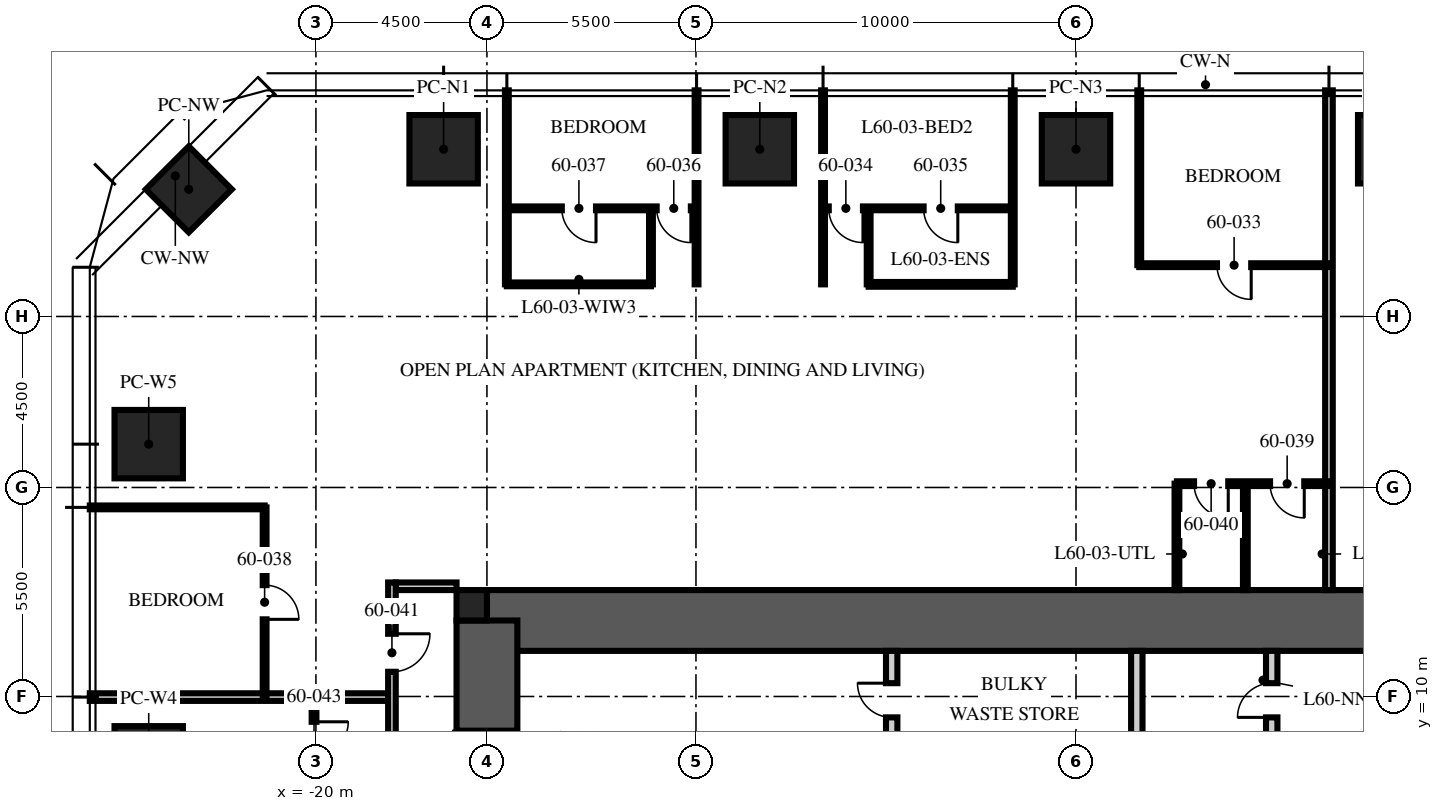
"""IFC4 building model, lengths in metres.
Left out: names, types, materials, properties, quantities, classifications, styles, units other than length and angle.
Written with IfcOpenShell. Run it as: python <this file> out.ifc"""

import sys

from ifc_helpers import new_model, si_unit, direction, frame, frame_2d, origin, origin_2d, place, context, subcontext, project, spatial, rectangle, extrude, element, fill, save


model = new_model("IFC4")
c1 = context("Model", 3, precision=1e-05, world=origin(), true_north=direction((0.0, 1.0)))
c2 = subcontext(c1, "Body", "Model", "MODEL_VIEW")
j1 = project(units=[si_unit("LENGTHUNIT", "METRE"), si_unit("PLANEANGLEUNIT", "RADIAN")], contexts=[c1])
p1 = place(None, origin())
s1 = spatial("IfcSite", under=j1, at=p1, CompositionType="ELEMENT")
p2 = place(p1, origin())
s2 = spatial("IfcBuilding", under=s1, at=p2, CompositionType="ELEMENT")
p3 = place(p2, frame((0.0, 0.0, 240.75)))
s3 = spatial("IfcBuildingStorey", under=s2, at=p3, CompositionType="ELEMENT", Elevation=240.75)
p4 = place(p3, frame((-15.5, 12.0, -0.25), z_axis=(0.0, 0.0, 1.0), x_axis=(1.0, 0.0, 0.0)))
e1 = element("IfcWall", 1, at=p4, inside=s3, PredefinedType="SHEAR", context=c2, shape_type="SweptSolid", body=[
    extrude(rectangle(XDim=31.0, YDim=1.6, at=frame_2d((15.5, 0.0))), origin(), (0.0, 0.0, 1.0), 3.75),
])
p5 = place(p3, frame((-15.5, -12.0, -0.25), z_axis=(0.0, 0.0, 1.0), x_axis=(0.0, 1.0, 0.0)))
e2 = element("IfcWall", 2, at=p5, inside=s3, PredefinedType="SHEAR", context=c2, shape_type="SweptSolid", body=[
    extrude(rectangle(XDim=24.0, YDim=1.6, at=frame_2d((12.0, 0.0))), origin(), (0.0, 0.0, 1.0), 3.75),
])
p6 = place(p5, frame((3.2, 0.0, 0.25)))
e3 = element("IfcOpeningElement", 3, at=p6, cuts=e2, PredefinedType="OPENING", context=c2, shape_type="SweptSolid", body=[
    extrude(rectangle(XDim=1.2, YDim=2.1, at=frame_2d((0.6, 1.05))), frame((0.0, 0.81, 0.0), z_axis=(0.0, -1.0, 0.0), x_axis=(1.0, 0.0, 0.0)), (0.0, 0.0, 1.0), 1.62),
])
p7 = place(p5, frame((19.3, 0.0, 0.25)))
e4 = element("IfcOpeningElement", 4, at=p7, cuts=e2, PredefinedType="OPENING", context=c2, shape_type="SweptSolid", body=[
    extrude(rectangle(XDim=1.8, YDim=2.1, at=frame_2d((0.9, 1.05))), frame((0.0, 0.81, 0.0), z_axis=(0.0, -1.0, 0.0), x_axis=(1.0, 0.0, 0.0)), (0.0, 0.0, 1.0), 1.62),
])
p8 = place(p3, frame((-15.9, 12.4, -0.25), z_axis=(0.0, 0.0, 1.0), x_axis=(1.0, 0.0, 0.0)))
e5 = element("IfcColumn", 5, at=p8, inside=s3, PredefinedType="COLUMN", context=c2, shape_type="SweptSolid", body=[
    extrude(rectangle(XDim=0.8, YDim=0.8, at=origin_2d()), origin(), (0.0, 0.0, 1.0), 3.75),
])
for number, where, z_axis, x_axis in (
    (6, (-16.64, 24.4, 0.0), (0.0, 0.0, 1.0), (1.0, 0.0, 0.0)),
    (7, (-8.32, 24.4, 0.0), (0.0, 0.0, 1.0), (1.0, 0.0, 0.0)),
    (8, (0.0, 24.4, 0.0), (0.0, 0.0, 1.0), (1.0, 0.0, 0.0)),
    (9, (8.32, 24.4, 0.0), (0.0, 0.0, 1.0), (1.0, 0.0, 0.0)),
    (10, (-24.4, 8.32, 0.0), (0.0, 0.0, 1.0), (0.0, 1.0, 0.0)),
    (11, (-24.4, 16.64, 0.0), (0.0, 0.0, 1.0), (0.0, 1.0, 0.0)),
):
    element("IfcColumn", number, at=place(p3, frame(where, z_axis=z_axis, x_axis=x_axis)), inside=s3, PredefinedType="COLUMN", context=c2, shape_type="SweptSolid", body=[
        extrude(rectangle(XDim=1.8, YDim=1.8, at=origin_2d()), origin(), (0.0, 0.0, 1.0), 3.75),
    ])
p9 = place(p3, frame((-23.346, 23.346, 0.0), z_axis=(0.0, 0.0, 1.0), x_axis=(0.707106781187, 0.707106781187, 0.0)))
e12 = element("IfcColumn", 12, at=p9, inside=s3, PredefinedType="COLUMN", context=c2, shape_type="SweptSolid", body=[
    extrude(rectangle(XDim=1.6, YDim=1.6, at=origin_2d()), origin(), (0.0, 0.0, 1.0), 3.75),
])
p10 = place(p3, frame((-4.85, 5.3, 0.0), z_axis=(0.0, 0.0, 1.0), x_axis=(0.0, 1.0, 0.0)))
e13 = element("IfcWall", 13, at=p10, inside=s3, PredefinedType="PARTITIONING", context=c2, shape_type="SweptSolid", body=[
    extrude(rectangle(XDim=5.9, YDim=0.3, at=frame_2d((2.95, 0.0))), origin(), (0.0, 0.0, 1.0), 3.5),
])
p11 = place(p10, frame((4.15, 0.0, 0.0)))
e14 = element("IfcOpeningElement", 14, at=p11, cuts=e13, PredefinedType="OPENING", context=c2, shape_type="SweptSolid", body=[
    extrude(rectangle(XDim=0.9, YDim=2.1, at=frame_2d((0.45, 1.05))), frame((0.0, 0.16, 0.0), z_axis=(0.0, -1.0, 0.0), x_axis=(1.0, 0.0, 0.0)), (0.0, 0.0, 1.0), 0.32),
])
p12 = place(p3, frame((5.15, 5.3, 0.0), z_axis=(0.0, 0.0, 1.0), x_axis=(0.0, 1.0, 0.0)))
e15 = element("IfcWall", 15, at=p12, inside=s3, PredefinedType="PARTITIONING", context=c2, shape_type="SweptSolid", body=[
    extrude(rectangle(XDim=5.9, YDim=0.3, at=frame_2d((2.95, 0.0))), origin(), (0.0, 0.0, 1.0), 3.5),
])
p13 = place(p12, frame((4.15, 0.0, 0.0)))
e16 = element("IfcOpeningElement", 16, at=p13, cuts=e15, PredefinedType="OPENING", context=c2, shape_type="SweptSolid", body=[
    extrude(rectangle(XDim=0.9, YDim=2.1, at=frame_2d((0.45, 1.05))), frame((0.0, 0.16, 0.0), z_axis=(0.0, -1.0, 0.0), x_axis=(1.0, 0.0, 0.0)), (0.0, 0.0, 1.0), 0.32),
])
p14 = place(p3, frame((1.6, 8.5, 0.0), z_axis=(0.0, 0.0, 1.0), x_axis=(0.0, 1.0, 0.0)))
e17 = element("IfcWall", 17, at=p14, inside=s3, PredefinedType="PARTITIONING", context=c2, shape_type="SweptSolid", body=[
    extrude(rectangle(XDim=2.7, YDim=0.3, at=frame_2d((1.35, 0.0))), origin(), (0.0, 0.0, 1.0), 3.5),
])
p15 = place(p3, frame((-16.3, 12.9, 0.0), z_axis=(0.0, 0.0, 1.0), x_axis=(-1.0, 0.0, 0.0)))
e18 = element("IfcWall", 18, at=p15, inside=s3, PredefinedType="PARTITIONING", context=c2, shape_type="SweptSolid", body=[
    extrude(rectangle(XDim=1.6, YDim=0.2, at=frame_2d((0.8, 0.0))), origin(), (0.0, 0.0, 1.0), 2.3),
])
p16 = place(p3, frame((6.656, 12.8, 0.0), z_axis=(0.0, 0.0, 1.0), x_axis=(0.0, 1.0, 0.0)))
e19 = element("IfcWall", 19, at=p16, inside=s3, PredefinedType="PARTITIONING", context=c2, shape_type="SweptSolid", body=[
    extrude(rectangle(XDim=13.15, YDim=0.2, at=frame_2d((6.575, 0.0))), origin(), (0.0, 0.0, 1.0), 2.91),
])
p17 = place(p3, frame((1.664, 21.35, 0.0), z_axis=(0.0, 0.0, 1.0), x_axis=(0.0, 1.0, 0.0)))
e20 = element("IfcWall", 20, at=p17, inside=s3, PredefinedType="PARTITIONING", context=c2, shape_type="SweptSolid", body=[
    extrude(rectangle(XDim=4.6, YDim=0.1, at=frame_2d((2.3, 0.0))), origin(), (0.0, 0.0, 1.0), 2.91),
])
for number, where, z_axis, x_axis in (
    (21, (-1.664, 20.845, 0.0), (0.0, 0.0, 1.0), (0.0, 1.0, 0.0)),
    (22, (-6.656, 20.845, 0.0), (0.0, 0.0, 1.0), (0.0, 1.0, 0.0)),
    (23, (-9.984, 20.845, 0.0), (0.0, 0.0, 1.0), (0.0, 1.0, 0.0)),
    (24, (-14.976, 20.845, 0.0), (0.0, 0.0, 1.0), (0.0, 1.0, 0.0)),
):
    element("IfcWall", number, at=place(p3, frame(where, z_axis=z_axis, x_axis=x_axis)), inside=s3, PredefinedType="PARTITIONING", context=c2, shape_type="SweptSolid", body=[
        extrude(rectangle(XDim=5.105, YDim=0.1, at=frame_2d((2.552, 0.0))), origin(), (0.0, 0.0, 1.0), 2.91),
    ])
p18 = place(p3, frame((-21.35, 14.976, 0.0), z_axis=(0.0, 0.0, 1.0), x_axis=(-1.0, 0.0, 0.0)))
e25 = element("IfcWall", 25, at=p18, inside=s3, PredefinedType="PARTITIONING", context=c2, shape_type="SweptSolid", body=[
    extrude(rectangle(XDim=4.6, YDim=0.1, at=frame_2d((2.3, 0.0))), origin(), (0.0, 0.0, 1.0), 2.91),
])
p19 = place(p3, frame((-18.1, 9.984, 0.0), z_axis=(0.0, 0.0, 1.0), x_axis=(-1.0, 0.0, 0.0)))
e26 = element("IfcWall", 26, at=p19, inside=s3, PredefinedType="PARTITIONING", context=c2, shape_type="SweptSolid", body=[
    extrude(rectangle(XDim=7.85, YDim=0.2, at=frame_2d((3.925, 0.0))), origin(), (0.0, 0.0, 1.0), 2.91),
])
p20 = place(p3, frame((6.656, 21.35, 0.0), z_axis=(0.0, 0.0, 1.0), x_axis=(-1.0, 0.0, 0.0)))
e27 = element("IfcWall", 27, at=p20, inside=s3, PredefinedType="PARTITIONING", context=c2, shape_type="SweptSolid", body=[
    extrude(rectangle(XDim=4.992, YDim=0.1, at=frame_2d((2.496, 0.0))), origin(), (0.0, 0.0, 1.0), 2.81),
])
p21 = place(p20, frame((2.046, 0.0, 0.0)))
e28 = element("IfcOpeningElement", 28, at=p21, cuts=e27, PredefinedType="OPENING", context=c2, shape_type="SweptSolid", body=[
    extrude(rectangle(XDim=0.9, YDim=2.1, at=frame_2d((0.45, 1.05))), frame((0.0, 0.06, 0.0), z_axis=(0.0, -1.0, 0.0), x_axis=(1.0, 0.0, 0.0)), (0.0, 0.0, 1.0), 0.12),
])
p22 = place(p3, frame((-1.664, 22.845, 0.0), z_axis=(0.0, 0.0, 1.0), x_axis=(-1.0, 0.0, 0.0)))
e29 = element("IfcWall", 29, at=p22, inside=s3, PredefinedType="PARTITIONING", context=c2, shape_type="SweptSolid", body=[
    extrude(rectangle(XDim=4.992, YDim=0.1, at=frame_2d((2.496, 0.0))), origin(), (0.0, 0.0, 1.0), 2.81),
])
p23 = place(p22, frame((3.942, 0.0, 0.0)))
e30 = element("IfcOpeningElement", 30, at=p23, cuts=e29, PredefinedType="OPENING", context=c2, shape_type="SweptSolid", body=[
    extrude(rectangle(XDim=0.9, YDim=2.1, at=frame_2d((0.45, 1.05))), frame((0.0, 0.06, 0.0), z_axis=(0.0, -1.0, 0.0), x_axis=(1.0, 0.0, 0.0)), (0.0, 0.0, 1.0), 0.12),
])
p24 = place(p22, frame((1.446, 0.0, 0.0)))
e31 = element("IfcOpeningElement", 31, at=p24, cuts=e29, PredefinedType="OPENING", context=c2, shape_type="SweptSolid", body=[
    extrude(rectangle(XDim=0.9, YDim=2.1, at=frame_2d((0.45, 1.05))), frame((0.0, 0.06, 0.0), z_axis=(0.0, -1.0, 0.0), x_axis=(1.0, 0.0, 0.0)), (0.0, 0.0, 1.0), 0.12),
])
p25 = place(p3, frame((-5.456, 20.845, 0.0), z_axis=(0.0, 0.0, 1.0), x_axis=(0.0, 1.0, 0.0)))
e32 = element("IfcWall", 32, at=p25, inside=s3, PredefinedType="PARTITIONING", context=c2, shape_type="SweptSolid", body=[
    extrude(rectangle(XDim=2.0, YDim=0.1, at=frame_2d((1.0, 0.0))), origin(), (0.0, 0.0, 1.0), 3.5),
])
p26 = place(p3, frame((-1.664, 20.845, 0.0), z_axis=(0.0, 0.0, 1.0), x_axis=(-1.0, 0.0, 0.0)))
e33 = element("IfcWall", 33, at=p26, inside=s3, PredefinedType="PARTITIONING", context=c2, shape_type="SweptSolid", body=[
    extrude(rectangle(XDim=3.792, YDim=0.125, at=frame_2d((1.896, 0.0))), origin(), (0.0, 0.0, 1.0), 2.81),
])
p27 = place(p3, frame((-9.984, 22.845, 0.0), z_axis=(0.0, 0.0, 1.0), x_axis=(-1.0, 0.0, 0.0)))
e34 = element("IfcWall", 34, at=p27, inside=s3, PredefinedType="PARTITIONING", context=c2, shape_type="SweptSolid", body=[
    extrude(rectangle(XDim=4.992, YDim=0.1, at=frame_2d((2.496, 0.0))), origin(), (0.0, 0.0, 1.0), 2.81),
])
p28 = place(p27, frame((0.15, 0.0, 0.0)))
e35 = element("IfcOpeningElement", 35, at=p28, cuts=e34, PredefinedType="OPENING", context=c2, shape_type="SweptSolid", body=[
    extrude(rectangle(XDim=0.9, YDim=2.1, at=frame_2d((0.45, 1.05))), frame((0.0, 0.06, 0.0), z_axis=(0.0, -1.0, 0.0), x_axis=(1.0, 0.0, 0.0)), (0.0, 0.0, 1.0), 0.12),
])
p29 = place(p27, frame((2.646, 0.0, 0.0)))
e36 = element("IfcOpeningElement", 36, at=p29, cuts=e34, PredefinedType="OPENING", context=c2, shape_type="SweptSolid", body=[
    extrude(rectangle(XDim=0.9, YDim=2.1, at=frame_2d((0.45, 1.05))), frame((0.0, 0.06, 0.0), z_axis=(0.0, -1.0, 0.0), x_axis=(1.0, 0.0, 0.0)), (0.0, 0.0, 1.0), 0.12),
])
p30 = place(p3, frame((-11.184, 20.845, 0.0), z_axis=(0.0, 0.0, 1.0), x_axis=(0.0, 1.0, 0.0)))
e37 = element("IfcWall", 37, at=p30, inside=s3, PredefinedType="PARTITIONING", context=c2, shape_type="SweptSolid", body=[
    extrude(rectangle(XDim=2.0, YDim=0.1, at=frame_2d((1.0, 0.0))), origin(), (0.0, 0.0, 1.0), 3.5),
])
p31 = place(p3, frame((-11.184, 20.845, 0.0), z_axis=(0.0, 0.0, 1.0), x_axis=(-1.0, 0.0, 0.0)))
e38 = element("IfcWall", 38, at=p31, inside=s3, PredefinedType="PARTITIONING", context=c2, shape_type="SweptSolid", body=[
    extrude(rectangle(XDim=3.792, YDim=0.1, at=frame_2d((1.896, 0.0))), origin(), (0.0, 0.0, 1.0), 2.81),
])
p32 = place(p3, frame((-21.35, 14.976, 0.0), z_axis=(0.0, 0.0, 1.0), x_axis=(0.0, -1.0, 0.0)))
e39 = element("IfcWall", 39, at=p32, inside=s3, PredefinedType="PARTITIONING", context=c2, shape_type="SweptSolid", body=[
    extrude(rectangle(XDim=4.992, YDim=0.1, at=frame_2d((2.496, 0.0))), origin(), (0.0, 0.0, 1.0), 2.81),
])
p33 = place(p32, frame((2.046, 0.0, 0.0)))
e40 = element("IfcOpeningElement", 40, at=p33, cuts=e39, PredefinedType="OPENING", context=c2, shape_type="SweptSolid", body=[
    extrude(rectangle(XDim=0.9, YDim=2.1, at=frame_2d((0.45, 1.05))), frame((0.0, 0.06, 0.0), z_axis=(0.0, -1.0, 0.0), x_axis=(1.0, 0.0, 0.0)), (0.0, 0.0, 1.0), 0.12),
])
p34 = place(p3, frame((6.656, 15.6, 0.0), z_axis=(0.0, 0.0, 1.0), x_axis=(-1.0, 0.0, 0.0)))
e41 = element("IfcWall", 41, at=p34, inside=s3, PredefinedType="PARTITIONING", context=c2, shape_type="SweptSolid", body=[
    extrude(rectangle(XDim=4.0, YDim=0.125, at=frame_2d((2.0, 0.0))), origin(), (0.0, 0.0, 1.0), 2.81),
])
p35 = place(p34, frame((0.65, 0.0, 0.0)))
e42 = element("IfcOpeningElement", 42, at=p35, cuts=e41, PredefinedType="OPENING", context=c2, shape_type="SweptSolid", body=[
    extrude(rectangle(XDim=0.9, YDim=2.1, at=frame_2d((0.45, 1.05))), frame((0.0, 0.073, 0.0), z_axis=(0.0, -1.0, 0.0), x_axis=(1.0, 0.0, 0.0)), (0.0, 0.0, 1.0), 0.145),
])
p36 = place(p34, frame((2.65, 0.0, 0.0)))
e43 = element("IfcOpeningElement", 43, at=p36, cuts=e41, PredefinedType="OPENING", context=c2, shape_type="SweptSolid", body=[
    extrude(rectangle(XDim=0.9, YDim=2.1, at=frame_2d((0.45, 1.05))), frame((0.0, 0.073, 0.0), z_axis=(0.0, -1.0, 0.0), x_axis=(1.0, 0.0, 0.0)), (0.0, 0.0, 1.0), 0.145),
])
for number, where, z_axis, x_axis in (
    (44, (4.456, 12.8, 0.0), (0.0, 0.0, 1.0), (0.0, 1.0, 0.0)),
    (45, (2.656, 12.8, 0.0), (0.0, 0.0, 1.0), (0.0, 1.0, 0.0)),
):
    element("IfcWall", number, at=place(p3, frame(where, z_axis=z_axis, x_axis=x_axis)), inside=s3, PredefinedType="PARTITIONING", context=c2, shape_type="SweptSolid", body=[
        extrude(rectangle(XDim=2.8, YDim=0.125, at=frame_2d((1.4, 0.0))), origin(), (0.0, 0.0, 1.0), 3.5),
    ])
p37 = place(p3, frame((-20.05, 9.984, 0.0), z_axis=(0.0, 0.0, 1.0), x_axis=(0.0, -1.0, 0.0)))
e46 = element("IfcWall", 46, at=p37, inside=s3, PredefinedType="PARTITIONING", context=c2, shape_type="SweptSolid", body=[
    extrude(rectangle(XDim=2.2, YDim=0.125, at=frame_2d((1.1, 0.0))), origin(), (0.0, 0.0, 1.0), 2.6),
])
p38 = place(p37, frame((0.65, 0.0, 0.0)))
e47 = element("IfcOpeningElement", 47, at=p38, cuts=e46, PredefinedType="OPENING", context=c2, shape_type="SweptSolid", body=[
    extrude(rectangle(XDim=0.9, YDim=2.1, at=frame_2d((0.45, 1.05))), frame((0.0, 0.073, 0.0), z_axis=(0.0, -1.0, 0.0), x_axis=(1.0, 0.0, 0.0)), (0.0, 0.0, 1.0), 0.145),
])
p39 = place(p3, frame((-18.0, 13.0, 0.0), z_axis=(0.0, 0.0, 1.0), x_axis=(0.0, -1.0, 0.0)))
e48 = element("IfcWall", 48, at=p39, inside=s3, PredefinedType="PARTITIONING", context=c2, shape_type="SweptSolid", body=[
    extrude(rectangle(XDim=26.0, YDim=0.2, at=frame_2d((13.0, 0.0))), origin(), (0.0, 0.0, 1.0), 2.6),
])
p40 = place(p39, frame((1.35, 0.0, 0.0)))
e49 = element("IfcOpeningElement", 49, at=p40, cuts=e48, PredefinedType="OPENING", context=c2, shape_type="SweptSolid", body=[
    extrude(rectangle(XDim=1.0, YDim=2.2, at=frame_2d((0.5, 1.1))), frame((0.0, 0.11, 0.0), z_axis=(0.0, -1.0, 0.0), x_axis=(1.0, 0.0, 0.0)), (0.0, 0.0, 1.0), 0.22),
])
p41 = place(p39, frame((9.786, 0.0, 0.0)))
e50 = element("IfcOpeningElement", 50, at=p41, cuts=e48, PredefinedType="OPENING", context=c2, shape_type="SweptSolid", body=[
    extrude(rectangle(XDim=1.0, YDim=2.2, at=frame_2d((0.5, 1.1))), frame((0.0, 0.11, 0.0), z_axis=(0.0, -1.0, 0.0), x_axis=(1.0, 0.0, 0.0)), (0.0, 0.0, 1.0), 0.22),
])
p42 = place(p39, frame((23.856, 0.0, 0.0)))
e51 = element("IfcOpeningElement", 51, at=p42, cuts=e48, PredefinedType="OPENING", context=c2, shape_type="SweptSolid", body=[
    extrude(rectangle(XDim=1.0, YDim=2.2, at=frame_2d((0.5, 1.1))), frame((0.0, 0.11, 0.0), z_axis=(0.0, -1.0, 0.0), x_axis=(1.0, 0.0, 0.0)), (0.0, 0.0, 1.0), 0.22),
])
p43 = place(p7, origin())
e52 = element("IfcDoor", 52, at=p43, inside=s3, OperationType="DOUBLE_DOOR_SINGLE_SWING", PredefinedType="DOOR", context=c2, shape_type="SweptSolid", body=[
    extrude(rectangle(XDim=1.8, YDim=2.1, at=frame_2d((0.9, 1.05))), frame((0.0, 0.025, 0.0), z_axis=(0.0, -1.0, 0.0), x_axis=(1.0, 0.0, 0.0)), (0.0, 0.0, 1.0), 0.05),
])
fill(e4, e52)
p44 = place(p11, origin())
e53 = element("IfcDoor", 53, at=p44, inside=s3, OperationType="SINGLE_SWING_RIGHT", PredefinedType="DOOR", context=c2, shape_type="SweptSolid", body=[
    extrude(rectangle(XDim=0.9, YDim=2.1, at=frame_2d((0.45, 1.05))), frame((0.0, 0.025, 0.0), z_axis=(0.0, -1.0, 0.0), x_axis=(1.0, 0.0, 0.0)), (0.0, 0.0, 1.0), 0.05),
])
fill(e14, e53)
p45 = place(p13, origin())
e54 = element("IfcDoor", 54, at=p45, inside=s3, OperationType="SINGLE_SWING_LEFT", PredefinedType="DOOR", context=c2, shape_type="SweptSolid", body=[
    extrude(rectangle(XDim=0.9, YDim=2.1, at=frame_2d((0.45, 1.05))), frame((0.0, 0.025, 0.0), z_axis=(0.0, -1.0, 0.0), x_axis=(1.0, 0.0, 0.0)), (0.0, 0.0, 1.0), 0.05),
])
fill(e16, e54)
p46 = place(p21, origin())
e55 = element("IfcDoor", 55, at=p46, inside=s3, OperationType="SINGLE_SWING_LEFT", PredefinedType="DOOR", context=c2, shape_type="SweptSolid", body=[
    extrude(rectangle(XDim=0.9, YDim=2.1, at=frame_2d((0.45, 1.05))), frame((0.0, 0.025, 0.0), z_axis=(0.0, -1.0, 0.0), x_axis=(1.0, 0.0, 0.0)), (0.0, 0.0, 1.0), 0.05),
])
fill(e28, e55)
p47 = place(p23, origin())
e56 = element("IfcDoor", 56, at=p47, inside=s3, OperationType="SINGLE_SWING_LEFT", PredefinedType="DOOR", context=c2, shape_type="SweptSolid", body=[
    extrude(rectangle(XDim=0.9, YDim=2.1, at=frame_2d((0.45, 1.05))), frame((0.0, 0.025, 0.0), z_axis=(0.0, -1.0, 0.0), x_axis=(1.0, 0.0, 0.0)), (0.0, 0.0, 1.0), 0.05),
])
fill(e30, e56)
p48 = place(p24, origin())
e57 = element("IfcDoor", 57, at=p48, inside=s3, OperationType="SINGLE_SWING_LEFT", PredefinedType="DOOR", context=c2, shape_type="SweptSolid", body=[
    extrude(rectangle(XDim=0.9, YDim=2.1, at=frame_2d((0.45, 1.05))), frame((0.0, 0.025, 0.0), z_axis=(0.0, -1.0, 0.0), x_axis=(1.0, 0.0, 0.0)), (0.0, 0.0, 1.0), 0.05),
])
fill(e31, e57)
p49 = place(p28, origin())
e58 = element("IfcDoor", 58, at=p49, inside=s3, OperationType="SINGLE_SWING_LEFT", PredefinedType="DOOR", context=c2, shape_type="SweptSolid", body=[
    extrude(rectangle(XDim=0.9, YDim=2.1, at=frame_2d((0.45, 1.05))), frame((0.0, 0.025, 0.0), z_axis=(0.0, -1.0, 0.0), x_axis=(1.0, 0.0, 0.0)), (0.0, 0.0, 1.0), 0.05),
])
fill(e35, e58)
p50 = place(p29, origin())
e59 = element("IfcDoor", 59, at=p50, inside=s3, OperationType="SINGLE_SWING_LEFT", PredefinedType="DOOR", context=c2, shape_type="SweptSolid", body=[
    extrude(rectangle(XDim=0.9, YDim=2.1, at=frame_2d((0.45, 1.05))), frame((0.0, 0.025, 0.0), z_axis=(0.0, -1.0, 0.0), x_axis=(1.0, 0.0, 0.0)), (0.0, 0.0, 1.0), 0.05),
])
fill(e36, e59)
p51 = place(p33, origin())
e60 = element("IfcDoor", 60, at=p51, inside=s3, OperationType="SINGLE_SWING_RIGHT", PredefinedType="DOOR", context=c2, shape_type="SweptSolid", body=[
    extrude(rectangle(XDim=0.9, YDim=2.1, at=frame_2d((0.45, 1.05))), frame((0.0, 0.025, 0.0), z_axis=(0.0, -1.0, 0.0), x_axis=(1.0, 0.0, 0.0)), (0.0, 0.0, 1.0), 0.05),
])
fill(e40, e60)
p52 = place(p35, origin())
e61 = element("IfcDoor", 61, at=p52, inside=s3, OperationType="SINGLE_SWING_LEFT", PredefinedType="DOOR", context=c2, shape_type="SweptSolid", body=[
    extrude(rectangle(XDim=0.9, YDim=2.1, at=frame_2d((0.45, 1.05))), frame((0.0, 0.025, 0.0), z_axis=(0.0, -1.0, 0.0), x_axis=(1.0, 0.0, 0.0)), (0.0, 0.0, 1.0), 0.05),
])
fill(e42, e61)
p53 = place(p36, origin())
e62 = element("IfcDoor", 62, at=p53, inside=s3, OperationType="SINGLE_SWING_LEFT", PredefinedType="DOOR", context=c2, shape_type="SweptSolid", body=[
    extrude(rectangle(XDim=0.9, YDim=2.1, at=frame_2d((0.45, 1.05))), frame((0.0, 0.025, 0.0), z_axis=(0.0, -1.0, 0.0), x_axis=(1.0, 0.0, 0.0)), (0.0, 0.0, 1.0), 0.05),
])
fill(e43, e62)
p54 = place(p40, origin())
e63 = element("IfcDoor", 63, at=p54, inside=s3, OperationType="SINGLE_SWING_LEFT", PredefinedType="DOOR", context=c2, shape_type="SweptSolid", body=[
    extrude(rectangle(XDim=1.0, YDim=2.2, at=frame_2d((0.5, 1.1))), frame((0.0, 0.025, 0.0), z_axis=(0.0, -1.0, 0.0), x_axis=(1.0, 0.0, 0.0)), (0.0, 0.0, 1.0), 0.05),
])
fill(e49, e63)
p55 = place(p38, origin())
e64 = element("IfcDoor", 64, at=p55, inside=s3, OperationType="SINGLE_SWING_LEFT", PredefinedType="DOOR", context=c2, shape_type="SweptSolid", body=[
    extrude(rectangle(XDim=0.9, YDim=2.1, at=frame_2d((0.45, 1.05))), frame((0.0, 0.025, 0.0), z_axis=(0.0, -1.0, 0.0), x_axis=(1.0, 0.0, 0.0)), (0.0, 0.0, 1.0), 0.05),
])
fill(e47, e64)
save(model, sys.argv[1])
